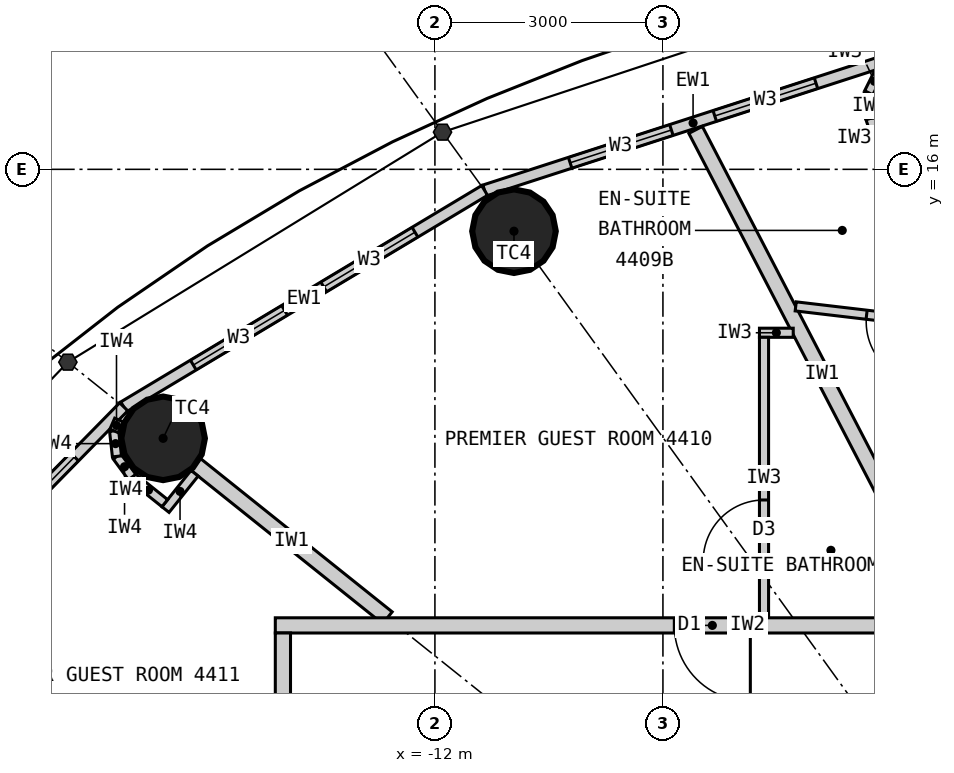
"""IFC4 building model, lengths in metres.
Left out: names, types, materials, properties, quantities, classifications, styles, units other than length and angle.
Written with IfcOpenShell. Run it as: python <this file> out.ifc"""

import sys

from ifc_helpers import new_model, si_unit, direction, frame, frame_2d, origin, origin_2d, place, context, subcontext, project, spatial, rectangle, circle, extrude, element, fill, save


model = new_model("IFC4")
c1 = context("Model", 3, precision=1e-05, world=origin(), true_north=direction((0.0, 1.0)))
c2 = subcontext(c1, "Body", "Model", "MODEL_VIEW")
j1 = project(units=[si_unit("LENGTHUNIT", "METRE"), si_unit("PLANEANGLEUNIT", "RADIAN")], contexts=[c1])
p1 = place(None, origin())
s1 = spatial("IfcSite", under=j1, at=p1, CompositionType="ELEMENT")
p2 = place(p1, origin())
s2 = spatial("IfcBuilding", under=s1, at=p2, CompositionType="ELEMENT")
p3 = place(p2, frame((0.0, 0.0, 166.5)))
s3 = spatial("IfcBuildingStorey", under=s2, at=p3, CompositionType="ELEMENT", Elevation=166.5)
for number, where, z_axis, x_axis in (
    (1, (-10.96, 15.186, 0.0), (0.0, 0.0, 1.0), (1.0, 0.0, 0.0)),
    (2, (-15.576, 12.461, 0.0), (0.0, 0.0, 1.0), (1.0, 0.0, 0.0)),
):
    element("IfcColumn", number, at=place(p3, frame(where, z_axis=z_axis, x_axis=x_axis)), inside=s3, PredefinedType="COLUMN", context=c2, shape_type="SweptSolid", body=[
        extrude(circle(Radius=0.55, at=origin_2d()), origin(), (0.0, 0.0, 1.0), 3.3),
    ])
p4 = place(p3, frame((-5.86, 17.497, 0.0), z_axis=(0.0, 0.0, 1.0), x_axis=(-0.951432482129, -0.307857486429, 0.0)))
e3 = element("IfcWall", 3, at=p4, inside=s3, PredefinedType="ELEMENTEDWALL", context=c2, shape_type="SweptSolid", body=[
    extrude(rectangle(XDim=5.766, YDim=0.15, at=frame_2d((2.883, 0.0))), origin(), (0.0, 0.0, 1.0), 3.12),
])
p5 = place(p4, frame((1.183, 0.0, 0.9)))
e4 = element("IfcOpeningElement", 4, at=p5, cuts=e3, PredefinedType="OPENING", context=c2, shape_type="SweptSolid", body=[
    extrude(rectangle(XDim=1.4, YDim=1.9, at=frame_2d((0.7, 0.95))), frame((0.0, 0.085, 0.0), z_axis=(0.0, -1.0, 0.0), x_axis=(1.0, 0.0, 0.0)), (0.0, 0.0, 1.0), 0.17),
])
p6 = place(p4, frame((3.183, 0.0, 0.9)))
e5 = element("IfcOpeningElement", 5, at=p6, cuts=e3, PredefinedType="OPENING", context=c2, shape_type="SweptSolid", body=[
    extrude(rectangle(XDim=1.4, YDim=1.9, at=frame_2d((0.7, 0.95))), frame((0.0, 0.085, 0.0), z_axis=(0.0, -1.0, 0.0), x_axis=(1.0, 0.0, 0.0)), (0.0, 0.0, 1.0), 0.17),
])
p7 = place(p3, frame((-11.346, 15.722, 0.0), z_axis=(0.0, 0.0, 1.0), x_axis=(-0.857695199231, -0.514158482587, 0.0)))
e6 = element("IfcWall", 6, at=p7, inside=s3, PredefinedType="ELEMENTEDWALL", context=c2, shape_type="SweptSolid", body=[
    extrude(rectangle(XDim=5.536, YDim=0.15, at=frame_2d((2.768, 0.0))), origin(), (0.0, 0.0, 1.0), 3.12),
])
p8 = place(p7, frame((1.068, 0.0, 0.9)))
e7 = element("IfcOpeningElement", 7, at=p8, cuts=e6, PredefinedType="OPENING", context=c2, shape_type="SweptSolid", body=[
    extrude(rectangle(XDim=1.4, YDim=1.9, at=frame_2d((0.7, 0.95))), frame((0.0, 0.085, 0.0), z_axis=(0.0, -1.0, 0.0), x_axis=(1.0, 0.0, 0.0)), (0.0, 0.0, 1.0), 0.17),
])
p9 = place(p7, frame((3.068, 0.0, 0.9)))
e8 = element("IfcOpeningElement", 8, at=p9, cuts=e6, PredefinedType="OPENING", context=c2, shape_type="SweptSolid", body=[
    extrude(rectangle(XDim=1.4, YDim=1.9, at=frame_2d((0.7, 0.95))), frame((0.0, 0.085, 0.0), z_axis=(0.0, -1.0, 0.0), x_axis=(1.0, 0.0, 0.0)), (0.0, 0.0, 1.0), 0.17),
])
p10 = place(p3, frame((-16.095, 12.876, 0.0), z_axis=(0.0, 0.0, 1.0), x_axis=(-0.700727467776, -0.71342905457, 0.0)))
e9 = element("IfcWall", 9, at=p10, inside=s3, PredefinedType="ELEMENTEDWALL", context=c2, shape_type="SweptSolid", body=[
    extrude(rectangle(XDim=5.247, YDim=0.15, at=frame_2d((2.624, 0.0))), origin(), (0.0, 0.0, 1.0), 3.12),
])
p11 = place(p10, frame((0.924, 0.0, 0.9)))
e10 = element("IfcOpeningElement", 10, at=p11, cuts=e9, PredefinedType="OPENING", context=c2, shape_type="SweptSolid", body=[
    extrude(rectangle(XDim=1.4, YDim=1.9, at=frame_2d((0.7, 0.95))), frame((0.0, 0.085, 0.0), z_axis=(0.0, -1.0, 0.0), x_axis=(1.0, 0.0, 0.0)), (0.0, 0.0, 1.0), 0.17),
])
p12 = place(p10, frame((2.924, 0.0, 0.9)))
e11 = element("IfcOpeningElement", 11, at=p12, cuts=e9, PredefinedType="OPENING", context=c2, shape_type="SweptSolid", body=[
    extrude(rectangle(XDim=1.4, YDim=1.9, at=frame_2d((0.7, 0.95))), frame((0.0, 0.085, 0.0), z_axis=(0.0, -1.0, 0.0), x_axis=(1.0, 0.0, 0.0)), (0.0, 0.0, 1.0), 0.17),
])
p13 = place(p3, frame((-5.24, 10.1, 0.0), z_axis=(0.0, 0.0, 1.0), x_axis=(-0.460532965373, 0.887642601391, 0.0)))
e12 = element("IfcWall", 12, at=p13, inside=s3, PredefinedType="PARTITIONING", context=c2, shape_type="SweptSolid", body=[
    extrude(rectangle(XDim=7.231, YDim=0.2, at=frame_2d((3.616, 0.0))), origin(), (0.0, 0.0, 1.0), 3.12),
])
p14 = place(p3, frame((-12.625, 10.1, 0.0), z_axis=(0.0, 0.0, 1.0), x_axis=(-0.780876185034, 0.624685827954, 0.0)))
e13 = element("IfcWall", 13, at=p14, inside=s3, PredefinedType="PARTITIONING", context=c2, shape_type="SweptSolid", body=[
    extrude(rectangle(XDim=3.229, YDim=0.2, at=frame_2d((1.615, 0.0))), origin(), (0.0, 0.0, 1.0), 2.42),
])
p15 = place(p3, frame((-7.253, 14.197, 0.0), z_axis=(0.0, 0.0, 1.0), x_axis=(0.993128188393, -0.117031625725, 0.0)))
e14 = element("IfcWall", 14, at=p15, inside=s3, PredefinedType="PARTITIONING", context=c2, shape_type="SweptSolid", body=[
    extrude(rectangle(XDim=2.678, YDim=0.12, at=frame_2d((1.339, 0.0))), origin(), (0.0, 0.0, 1.0), 3.12),
])
p16 = place(p15, frame((0.939, 0.0, 0.0)))
e15 = element("IfcOpeningElement", 15, at=p16, cuts=e14, PredefinedType="OPENING", context=c2, shape_type="SweptSolid", body=[
    extrude(rectangle(XDim=0.8, YDim=2.1, at=frame_2d((0.4, 1.05))), frame((0.0, 0.07, 0.0), z_axis=(0.0, -1.0, 0.0), x_axis=(1.0, 0.0, 0.0)), (0.0, 0.0, 1.0), 0.14),
])
p17 = place(p3, frame((-6.097, 16.149, 0.0), z_axis=(0.0, 0.0, 1.0), x_axis=(-0.317292604854, 0.948327687514, 0.0)))
e16 = element("IfcWall", 16, at=p17, inside=s3, PredefinedType="PARTITIONING", context=c2, shape_type="SweptSolid", body=[
    extrude(rectangle(XDim=0.55, YDim=0.12, at=frame_2d((0.275, 0.0))), origin(), (0.0, 0.0, 1.0), 3.12),
])
for number, where, z_axis, x_axis in (
    (17, (-6.271, 16.67, 0.0), (0.0, 0.0, 1.0), (-0.061, 0.998, 0.0)),
    (18, (-6.292, 17.007, 0.0), (0.0, 0.0, 1.0), (0.445, 0.895, 0.0)),
):
    element("IfcWall", number, at=place(p3, frame(where, z_axis=z_axis, x_axis=x_axis)), inside=s3, PredefinedType="PARTITIONING", context=c2, shape_type="SweptSolid", body=[
        extrude(rectangle(XDim=0.338, YDim=0.12, at=frame_2d((0.169, 0.0))), origin(), (0.0, 0.0, 1.0), 3.12),
    ])
p18 = place(p3, frame((-7.286, 13.85, 0.0), z_axis=(0.0, 0.0, 1.0), x_axis=(-1.0, 0.0, 0.0)))
e19 = element("IfcWall", 19, at=p18, inside=s3, PredefinedType="PARTITIONING", context=c2, shape_type="SweptSolid", body=[
    extrude(rectangle(XDim=0.444, YDim=0.12, at=frame_2d((0.222, 0.0))), origin(), (0.0, 0.0, 1.0), 3.12),
])
p19 = place(p3, frame((-7.67, 10.1, 0.0), z_axis=(0.0, 0.0, 1.0), x_axis=(0.0, 1.0, 0.0)))
e20 = element("IfcWall", 20, at=p19, inside=s3, PredefinedType="PARTITIONING", context=c2, shape_type="SweptSolid", body=[
    extrude(rectangle(XDim=3.69, YDim=0.12, at=frame_2d((1.845, 0.0))), origin(), (0.0, 0.0, 1.0), 3.12),
])
p20 = place(p19, frame((0.75, 0.0, 0.0)))
e21 = element("IfcOpeningElement", 21, at=p20, cuts=e20, PredefinedType="OPENING", context=c2, shape_type="SweptSolid", body=[
    extrude(rectangle(XDim=0.8, YDim=2.1, at=frame_2d((0.4, 1.05))), frame((0.0, 0.07, 0.0), z_axis=(0.0, -1.0, 0.0), x_axis=(1.0, 0.0, 0.0)), (0.0, 0.0, 1.0), 0.14),
])
p21 = place(p3, frame((-14.1, 10.0, 0.0), z_axis=(0.0, 0.0, 1.0), x_axis=(1.0, 0.0, 0.0)))
e22 = element("IfcWall", 22, at=p21, inside=s3, PredefinedType="PARTITIONING", context=c2, shape_type="SweptSolid", body=[
    extrude(rectangle(XDim=12.43, YDim=0.2, at=frame_2d((6.215, 0.0))), origin(), (0.0, 0.0, 1.0), 3.12),
])
p22 = place(p21, frame((5.25, 0.0, 0.0)))
e23 = element("IfcOpeningElement", 23, at=p22, cuts=e22, PredefinedType="OPENING", context=c2, shape_type="SweptSolid", body=[
    extrude(rectangle(XDim=1.0, YDim=2.2, at=frame_2d((0.5, 1.1))), frame((0.0, 0.11, 0.0), z_axis=(0.0, -1.0, 0.0), x_axis=(1.0, 0.0, 0.0)), (0.0, 0.0, 1.0), 0.22),
])
p23 = place(p3, frame((-14.0, 9.9, 0.0), z_axis=(0.0, 0.0, 1.0), x_axis=(0.0, -1.0, 0.0)))
e24 = element("IfcWall", 24, at=p23, inside=s3, PredefinedType="PARTITIONING", context=c2, shape_type="SweptSolid", body=[
    extrude(rectangle(XDim=8.23, YDim=0.2, at=frame_2d((4.115, 0.0))), origin(), (0.0, 0.0, 1.0), 3.12),
])
p24 = place(p23, frame((1.678, 0.0, 0.0)))
e25 = element("IfcOpeningElement", 25, at=p24, cuts=e24, PredefinedType="OPENING", context=c2, shape_type="SweptSolid", body=[
    extrude(rectangle(XDim=1.0, YDim=2.2, at=frame_2d((0.5, 1.1))), frame((0.0, 0.11, 0.0), z_axis=(0.0, -1.0, 0.0), x_axis=(1.0, 0.0, 0.0)), (0.0, 0.0, 1.0), 0.22),
])
p25 = place(p3, frame((-15.162, 12.002, 0.0), z_axis=(0.0, 0.0, 1.0), x_axis=(-0.624597762427, -0.780946627607, 0.0)))
e26 = element("IfcWall", 26, at=p25, inside=s3, PredefinedType="PARTITIONING", context=c2, shape_type="SweptSolid", body=[
    extrude(rectangle(XDim=0.612, YDim=0.12, at=frame_2d((0.306, 0.0))), origin(), (0.0, 0.0, 1.0), 3.12),
])
p26 = place(p3, frame((-15.554, 11.608, 0.0), z_axis=(0.0, 0.0, 1.0), x_axis=(-0.780695577787, 0.624911525597, 0.0)))
e27 = element("IfcWall", 27, at=p26, inside=s3, PredefinedType="PARTITIONING", context=c2, shape_type="SweptSolid", body=[
    extrude(rectangle(XDim=0.55, YDim=0.12, at=frame_2d((0.275, 0.0))), origin(), (0.0, 0.0, 1.0), 3.12),
])
p27 = place(p3, frame((-15.984, 11.952, 0.0), z_axis=(0.0, 0.0, 1.0), x_axis=(-0.592335221171, 0.805691619517, 0.0)))
e28 = element("IfcWall", 28, at=p27, inside=s3, PredefinedType="PARTITIONING", context=c2, shape_type="SweptSolid", body=[
    extrude(rectangle(XDim=0.338, YDim=0.12, at=frame_2d((0.169, 0.0))), origin(), (0.0, 0.0, 1.0), 3.12),
])
p28 = place(p3, frame((-16.184, 12.224, 0.0), z_axis=(0.0, 0.0, 1.0), x_axis=(-0.110669692975, 0.993857242795, 0.0)))
e29 = element("IfcWall", 29, at=p28, inside=s3, PredefinedType="PARTITIONING", context=c2, shape_type="SweptSolid", body=[
    extrude(rectangle(XDim=0.337, YDim=0.12, at=frame_2d((0.169, 0.0))), origin(), (0.0, 0.0, 1.0), 3.12),
])
p29 = place(p3, frame((-16.221, 12.559, 0.0), z_axis=(0.0, 0.0, 1.0), x_axis=(0.401064416249, 0.916049853457, 0.0)))
e30 = element("IfcWall", 30, at=p29, inside=s3, PredefinedType="PARTITIONING", context=c2, shape_type="SweptSolid", body=[
    extrude(rectangle(XDim=0.156, YDim=0.12, at=frame_2d((0.078, 0.0))), origin(), (0.0, 0.0, 1.0), 3.12),
])
p30 = place(p5, origin())
e31 = element("IfcWindow", 31, at=p30, inside=s3, PartitioningType="SINGLE_PANEL", PredefinedType="WINDOW", context=c2, shape_type="SweptSolid", body=[
    extrude(rectangle(XDim=1.4, YDim=1.9, at=frame_2d((0.7, 0.95))), frame((0.0, 0.03, 0.0), z_axis=(0.0, -1.0, 0.0), x_axis=(1.0, 0.0, 0.0)), (0.0, 0.0, 1.0), 0.06),
])
fill(e4, e31)
p31 = place(p6, origin())
e32 = element("IfcWindow", 32, at=p31, inside=s3, PartitioningType="SINGLE_PANEL", PredefinedType="WINDOW", context=c2, shape_type="SweptSolid", body=[
    extrude(rectangle(XDim=1.4, YDim=1.9, at=frame_2d((0.7, 0.95))), frame((0.0, 0.03, 0.0), z_axis=(0.0, -1.0, 0.0), x_axis=(1.0, 0.0, 0.0)), (0.0, 0.0, 1.0), 0.06),
])
fill(e5, e32)
p32 = place(p8, origin())
e33 = element("IfcWindow", 33, at=p32, inside=s3, PartitioningType="SINGLE_PANEL", PredefinedType="WINDOW", context=c2, shape_type="SweptSolid", body=[
    extrude(rectangle(XDim=1.4, YDim=1.9, at=frame_2d((0.7, 0.95))), frame((0.0, 0.03, 0.0), z_axis=(0.0, -1.0, 0.0), x_axis=(1.0, 0.0, 0.0)), (0.0, 0.0, 1.0), 0.06),
])
fill(e7, e33)
p33 = place(p9, origin())
e34 = element("IfcWindow", 34, at=p33, inside=s3, PartitioningType="SINGLE_PANEL", PredefinedType="WINDOW", context=c2, shape_type="SweptSolid", body=[
    extrude(rectangle(XDim=1.4, YDim=1.9, at=frame_2d((0.7, 0.95))), frame((0.0, 0.03, 0.0), z_axis=(0.0, -1.0, 0.0), x_axis=(1.0, 0.0, 0.0)), (0.0, 0.0, 1.0), 0.06),
])
fill(e8, e34)
p34 = place(p11, origin())
e35 = element("IfcWindow", 35, at=p34, inside=s3, PartitioningType="SINGLE_PANEL", PredefinedType="WINDOW", context=c2, shape_type="SweptSolid", body=[
    extrude(rectangle(XDim=1.4, YDim=1.9, at=frame_2d((0.7, 0.95))), frame((0.0, 0.03, 0.0), z_axis=(0.0, -1.0, 0.0), x_axis=(1.0, 0.0, 0.0)), (0.0, 0.0, 1.0), 0.06),
])
fill(e10, e35)
p35 = place(p16, origin())
e36 = element("IfcDoor", 36, at=p35, inside=s3, OperationType="SINGLE_SWING_RIGHT", PredefinedType="DOOR", context=c2, shape_type="SweptSolid", body=[
    extrude(rectangle(XDim=0.8, YDim=2.1, at=frame_2d((0.4, 1.05))), frame((0.0, 0.025, 0.0), z_axis=(0.0, -1.0, 0.0), x_axis=(1.0, 0.0, 0.0)), (0.0, 0.0, 1.0), 0.05),
])
fill(e15, e36)
p36 = place(p20, origin())
e37 = element("IfcDoor", 37, at=p36, inside=s3, OperationType="SINGLE_SWING_LEFT", PredefinedType="DOOR", context=c2, shape_type="SweptSolid", body=[
    extrude(rectangle(XDim=0.8, YDim=2.1, at=frame_2d((0.4, 1.05))), frame((0.0, 0.025, 0.0), z_axis=(0.0, -1.0, 0.0), x_axis=(1.0, 0.0, 0.0)), (0.0, 0.0, 1.0), 0.05),
])
fill(e21, e37)
p37 = place(p22, origin())
e38 = element("IfcDoor", 38, at=p37, inside=s3, OperationType="SINGLE_SWING_RIGHT", PredefinedType="DOOR", context=c2, shape_type="SweptSolid", body=[
    extrude(rectangle(XDim=1.0, YDim=2.2, at=frame_2d((0.5, 1.1))), frame((0.0, 0.025, 0.0), z_axis=(0.0, -1.0, 0.0), x_axis=(1.0, 0.0, 0.0)), (0.0, 0.0, 1.0), 0.05),
])
fill(e23, e38)
save(model, sys.argv[1])
